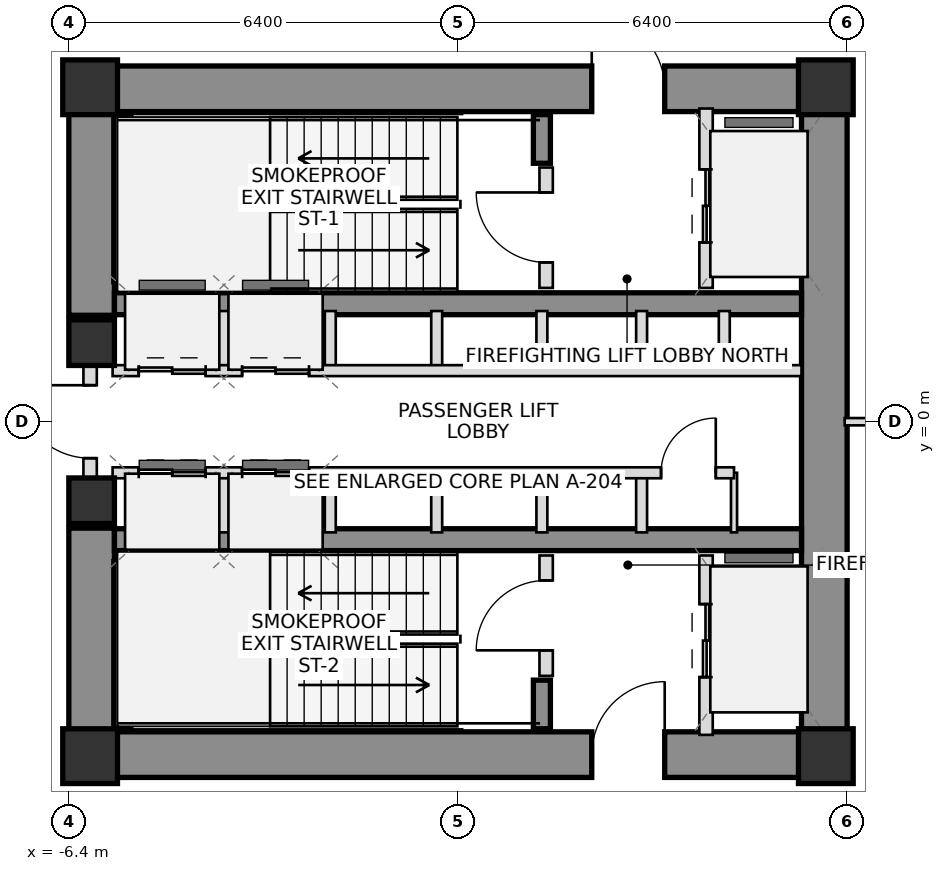
"""IFC4 building model, lengths in metres.
Left out: names, types, materials, properties, quantities, classifications, styles, units other than length and angle.
Written with IfcOpenShell. Run it as: python <this file> out.ifc"""

import sys

from ifc_helpers import new_model, si_unit, direction, frame, frame_2d, origin, origin_2d, place, context, subcontext, project, spatial, rectangle, extrude, source, transform, mapped, element, fill, save


model = new_model("IFC4")
c1 = context("Model", 3, precision=1e-05, world=origin(), true_north=direction((0.0, 1.0)))
c2 = subcontext(c1, "Body", "Model", "MODEL_VIEW")
j1 = project(units=[si_unit("LENGTHUNIT", "METRE"), si_unit("PLANEANGLEUNIT", "RADIAN")], contexts=[c1])
p1 = place(None, origin())
s1 = spatial("IfcSite", under=j1, at=p1, CompositionType="ELEMENT")
p2 = place(p1, origin())
s2 = spatial("IfcBuilding", under=s1, at=p2, CompositionType="ELEMENT")
p3 = place(p2, frame((0.0, 0.0, 20.1)))
s3 = spatial("IfcBuildingStorey", under=s2, at=p3, CompositionType="ELEMENT", Elevation=20.1)
m1 = source(origin(), c2, "Body", "SweptSolid", [
    extrude(rectangle(XDim=0.9, YDim=0.9, at=origin_2d()), origin(), (0.0, 0.0, 1.0), 3.7),
])
for number, where, z_axis, x_axis in (
    (1, (-6.05, -5.5, 0.0), (0.0, 0.0, 1.0), (1.0, 0.0, 0.0)),
    (2, (6.05, -5.5, 0.0), (0.0, 0.0, 1.0), (1.0, 0.0, 0.0)),
    (3, (6.05, 5.5, 0.0), (0.0, 0.0, 1.0), (1.0, 0.0, 0.0)),
    (4, (-6.05, 5.5, 0.0), (0.0, 0.0, 1.0), (1.0, 0.0, 0.0)),
):
    element("IfcColumn", number, at=place(p3, frame(where, z_axis=z_axis, x_axis=x_axis)), inside=s3, PredefinedType="COLUMN", context=c2, shape_type="MappedRepresentation", body=[
        mapped(m1, transform((0.0, 0.0, 0.0), scale=1.0)),
    ])
p4 = place(p3, frame((-6.4, 5.475, 0.0), z_axis=(0.0, 0.0, 1.0), x_axis=(1.0, 0.0, 0.0)))
e5 = element("IfcWall", 5, at=p4, inside=s3, PredefinedType="SHEAR", context=c2, shape_type="SweptSolid", body=[
    extrude(rectangle(XDim=12.8, YDim=0.75, at=frame_2d((6.4, 0.0))), origin(), (0.0, 0.0, 1.0), 3.7),
])
p5 = place(p4, frame((8.6, 0.0, 0.0)))
e6 = element("IfcOpeningElement", 6, at=p5, cuts=e5, PredefinedType="OPENING", context=c2, shape_type="SweptSolid", body=[
    extrude(rectangle(XDim=1.2, YDim=2.2, at=frame_2d((0.6, 1.1))), frame((0.0, 0.385, 0.0), z_axis=(0.0, -1.0, 0.0), x_axis=(1.0, 0.0, 0.0)), (0.0, 0.0, 1.0), 0.77),
])
p6 = place(p3, frame((-6.4, -5.475, 0.0), z_axis=(0.0, 0.0, 1.0), x_axis=(1.0, 0.0, 0.0)))
e7 = element("IfcWall", 7, at=p6, inside=s3, PredefinedType="SHEAR", context=c2, shape_type="SweptSolid", body=[
    extrude(rectangle(XDim=12.8, YDim=0.75, at=frame_2d((6.4, 0.0))), origin(), (0.0, 0.0, 1.0), 3.7),
])
p7 = place(p6, frame((8.6, 0.0, 0.0)))
e8 = element("IfcOpeningElement", 8, at=p7, cuts=e7, PredefinedType="OPENING", context=c2, shape_type="SweptSolid", body=[
    extrude(rectangle(XDim=1.2, YDim=2.2, at=frame_2d((0.6, 1.1))), frame((0.0, 0.385, 0.0), z_axis=(0.0, -1.0, 0.0), x_axis=(1.0, 0.0, 0.0)), (0.0, 0.0, 1.0), 0.77),
])
p8 = place(p3, frame((6.025, -5.1, 0.0), z_axis=(0.0, 0.0, 1.0), x_axis=(0.0, 1.0, 0.0)))
e9 = element("IfcWall", 9, at=p8, inside=s3, PredefinedType="SHEAR", context=c2, shape_type="SweptSolid", body=[
    extrude(rectangle(XDim=10.2, YDim=0.75, at=frame_2d((5.1, 0.0))), origin(), (0.0, 0.0, 1.0), 3.7),
])
for number, where, z_axis, x_axis in (
    (10, (-6.025, -5.1, 0.0), (0.0, 0.0, 1.0), (0.0, 1.0, 0.0)),
    (11, (-6.025, 1.75, 0.0), (0.0, 0.0, 1.0), (0.0, 1.0, 0.0)),
):
    element("IfcWall", number, at=place(p3, frame(where, z_axis=z_axis, x_axis=x_axis)), inside=s3, PredefinedType="SHEAR", context=c2, shape_type="SweptSolid", body=[
        extrude(rectangle(XDim=3.35, YDim=0.75, at=frame_2d((1.675, 0.0))), origin(), (0.0, 0.0, 1.0), 3.7),
    ])
for number, where, z_axis, x_axis in (
    (12, (-5.65, 1.94, 0.0), (0.0, 0.0, 1.0), (1.0, 0.0, 0.0)),
    (13, (-5.65, -1.94, 0.0), (0.0, 0.0, 1.0), (1.0, 0.0, 0.0)),
):
    element("IfcWall", number, at=place(p3, frame(where, z_axis=z_axis, x_axis=x_axis)), inside=s3, PredefinedType="SHEAR", context=c2, shape_type="SweptSolid", body=[
        extrude(rectangle(XDim=11.3, YDim=0.36, at=frame_2d((5.65, 0.0))), origin(), (0.0, 0.0, 1.0), 3.7),
    ])
p9 = place(p3, frame((-5.52, 2.3, 0.0), z_axis=(0.0, 0.0, 1.0), x_axis=(0.0, 1.0, 0.0)))
e14 = element("IfcWall", 14, at=p9, inside=s3, PredefinedType="SHEAR", context=c2, shape_type="SweptSolid", body=[
    extrude(rectangle(XDim=2.75, YDim=0.28, at=frame_2d((1.375, 0.0))), origin(), (0.0, 0.0, 1.0), 3.7),
])
p10 = place(p3, frame((1.38, 4.25, 0.0), z_axis=(0.0, 0.0, 1.0), x_axis=(0.0, 1.0, 0.0)))
e15 = element("IfcWall", 15, at=p10, inside=s3, PredefinedType="SHEAR", context=c2, shape_type="SweptSolid", body=[
    extrude(rectangle(XDim=0.8, YDim=0.28, at=frame_2d((0.4, 0.0))), origin(), (0.0, 0.0, 1.0), 3.7),
])
p11 = place(p3, frame((-5.52, -5.05, 0.0), z_axis=(0.0, 0.0, 1.0), x_axis=(0.0, 1.0, 0.0)))
e16 = element("IfcWall", 16, at=p11, inside=s3, PredefinedType="SHEAR", context=c2, shape_type="SweptSolid", body=[
    extrude(rectangle(XDim=2.75, YDim=0.28, at=frame_2d((1.375, 0.0))), origin(), (0.0, 0.0, 1.0), 3.7),
])
p12 = place(p3, frame((1.38, -5.05, 0.0), z_axis=(0.0, 0.0, 1.0), x_axis=(0.0, 1.0, 0.0)))
e17 = element("IfcWall", 17, at=p12, inside=s3, PredefinedType="SHEAR", context=c2, shape_type="SweptSolid", body=[
    extrude(rectangle(XDim=0.8, YDim=0.28, at=frame_2d((0.4, 0.0))), origin(), (0.0, 0.0, 1.0), 3.7),
])
m2 = source(origin(), c2, "Body", "SweptSolid", [
    extrude(rectangle(XDim=0.75, YDim=0.75, at=origin_2d()), origin(), (0.0, 0.0, 1.0), 3.7),
])
for number, where, z_axis, x_axis in (
    (18, (-6.025, -1.3, 0.0), (0.0, 0.0, 1.0), (1.0, 0.0, 0.0)),
    (19, (-6.025, 1.3, 0.0), (0.0, 0.0, 1.0), (1.0, 0.0, 0.0)),
):
    element("IfcColumn", number, at=place(p3, frame(where, z_axis=z_axis, x_axis=x_axis)), inside=s3, PredefinedType="COLUMN", context=c2, shape_type="MappedRepresentation", body=[
        mapped(m2, transform((0.0, 0.0, 0.0), scale=1.0)),
    ])
p13 = place(p3, frame((-6.05, -0.95, 0.0), z_axis=(0.0, 0.0, 1.0), x_axis=(0.0, 1.0, 0.0)))
e20 = element("IfcWall", 20, at=p13, inside=s3, PredefinedType="PLUMBINGWALL", context=c2, shape_type="SweptSolid", body=[
    extrude(rectangle(XDim=1.9, YDim=0.22, at=frame_2d((0.95, 0.0))), origin(), (0.0, 0.0, 1.0), 2.475),
])
p14 = place(p13, frame((0.35, 0.0, 0.0)))
e21 = element("IfcOpeningElement", 21, at=p14, cuts=e20, PredefinedType="OPENING", context=c2, shape_type="SweptSolid", body=[
    extrude(rectangle(XDim=1.2, YDim=2.2, at=frame_2d((0.6, 1.1))), frame((0.0, 0.12, 0.0), z_axis=(0.0, -1.0, 0.0), x_axis=(1.0, 0.0, 0.0)), (0.0, 0.0, 1.0), 0.24),
])
p15 = place(p3, frame((1.45, 2.2, 0.0), z_axis=(0.0, 0.0, 1.0), x_axis=(0.0, 1.0, 0.0)))
e22 = element("IfcWall", 22, at=p15, inside=s3, PredefinedType="PLUMBINGWALL", context=c2, shape_type="SweptSolid", body=[
    extrude(rectangle(XDim=1.98, YDim=0.22, at=frame_2d((0.99, 0.0))), origin(), (0.0, 0.0, 1.0), 3.495),
])
p16 = place(p15, frame((0.42, 0.0, 0.0)))
e23 = element("IfcOpeningElement", 23, at=p16, cuts=e22, PredefinedType="OPENING", context=c2, shape_type="SweptSolid", body=[
    extrude(rectangle(XDim=1.15, YDim=2.15, at=frame_2d((0.575, 1.075))), frame((0.0, 0.12, 0.0), z_axis=(0.0, -1.0, 0.0), x_axis=(1.0, 0.0, 0.0)), (0.0, 0.0, 1.0), 0.24),
])
p17 = place(p3, frame((4.08, 2.2, 0.0), z_axis=(0.0, 0.0, 1.0), x_axis=(0.0, 1.0, 0.0)))
e24 = element("IfcWall", 24, at=p17, inside=s3, PredefinedType="PLUMBINGWALL", context=c2, shape_type="SweptSolid", body=[
    extrude(rectangle(XDim=2.95, YDim=0.22, at=frame_2d((1.475, 0.0))), origin(), (0.0, 0.0, 1.0), 3.495),
])
p18 = place(p17, frame((0.75, 0.0, 0.0)))
e25 = element("IfcOpeningElement", 25, at=p18, cuts=e24, PredefinedType="OPENING", context=c2, shape_type="SweptSolid", body=[
    extrude(rectangle(XDim=1.2, YDim=2.25, at=frame_2d((0.6, 1.125))), frame((0.0, 0.12, 0.0), z_axis=(0.0, -1.0, 0.0), x_axis=(1.0, 0.0, 0.0)), (0.0, 0.0, 1.0), 0.24),
])
p19 = place(p3, frame((1.45, -4.18, 0.0), z_axis=(0.0, 0.0, 1.0), x_axis=(0.0, 1.0, 0.0)))
e26 = element("IfcWall", 26, at=p19, inside=s3, PredefinedType="PLUMBINGWALL", context=c2, shape_type="SweptSolid", body=[
    extrude(rectangle(XDim=1.98, YDim=0.22, at=frame_2d((0.99, 0.0))), origin(), (0.0, 0.0, 1.0), 3.495),
])
p20 = place(p19, frame((0.42, 0.0, 0.0)))
e27 = element("IfcOpeningElement", 27, at=p20, cuts=e26, PredefinedType="OPENING", context=c2, shape_type="SweptSolid", body=[
    extrude(rectangle(XDim=1.15, YDim=2.15, at=frame_2d((0.575, 1.075))), frame((0.0, 0.12, 0.0), z_axis=(0.0, -1.0, 0.0), x_axis=(1.0, 0.0, 0.0)), (0.0, 0.0, 1.0), 0.24),
])
p21 = place(p3, frame((4.08, -5.15, 0.0), z_axis=(0.0, 0.0, 1.0), x_axis=(0.0, 1.0, 0.0)))
e28 = element("IfcWall", 28, at=p21, inside=s3, PredefinedType="PLUMBINGWALL", context=c2, shape_type="SweptSolid", body=[
    extrude(rectangle(XDim=2.95, YDim=0.22, at=frame_2d((1.475, 0.0))), origin(), (0.0, 0.0, 1.0), 3.495),
])
p22 = place(p21, frame((0.95, 0.0, 0.0)))
e29 = element("IfcOpeningElement", 29, at=p22, cuts=e28, PredefinedType="OPENING", context=c2, shape_type="SweptSolid", body=[
    extrude(rectangle(XDim=1.2, YDim=2.25, at=frame_2d((0.6, 1.125))), frame((0.0, 0.12, 0.0), z_axis=(0.0, -1.0, 0.0), x_axis=(1.0, 0.0, 0.0)), (0.0, 0.0, 1.0), 0.24),
])
for number, where, z_axis, x_axis in (
    (30, (-3.85, 0.84, 0.0), (0.0, 0.0, 1.0), (0.0, 1.0, 0.0)),
    (31, (-3.85, -1.82, 0.0), (0.0, 0.0, 1.0), (0.0, 1.0, 0.0)),
    (32, (-2.1, 0.84, 0.0), (0.0, 0.0, 1.0), (0.0, 1.0, 0.0)),
    (33, (-2.1, -1.82, 0.0), (0.0, 0.0, 1.0), (0.0, 1.0, 0.0)),
    (34, (-0.35, 0.84, 0.0), (0.0, 0.0, 1.0), (0.0, 1.0, 0.0)),
    (35, (-0.35, -1.82, 0.0), (0.0, 0.0, 1.0), (0.0, 1.0, 0.0)),
    (36, (1.38, 0.84, 0.0), (0.0, 0.0, 1.0), (0.0, 1.0, 0.0)),
    (37, (1.38, -1.82, 0.0), (0.0, 0.0, 1.0), (0.0, 1.0, 0.0)),
    (38, (3.02, 0.84, 0.0), (0.0, 0.0, 1.0), (0.0, 1.0, 0.0)),
    (39, (4.38, 0.84, 0.0), (0.0, 0.0, 1.0), (0.0, 1.0, 0.0)),
    (40, (3.02, -1.82, 0.0), (0.0, 0.0, 1.0), (0.0, 1.0, 0.0)),
):
    element("IfcWall", number, at=place(p3, frame(where, z_axis=z_axis, x_axis=x_axis)), inside=s3, PredefinedType="PLUMBINGWALL", context=c2, shape_type="SweptSolid", body=[
        extrude(rectangle(XDim=0.98, YDim=0.18, at=frame_2d((0.49, 0.0))), origin(), (0.0, 0.0, 1.0), 3.495),
    ])
p23 = place(p3, frame((4.54, -1.82, 0.0), z_axis=(0.0, 0.0, 1.0), x_axis=(0.0, 1.0, 0.0)))
e41 = element("IfcWall", 41, at=p23, inside=s3, PredefinedType="PARTITIONING", context=c2, shape_type="SweptSolid", body=[
    extrude(rectangle(XDim=0.98, YDim=0.1, at=frame_2d((0.49, 0.0))), origin(), (0.0, 0.0, 1.0), 3.495),
])
p24 = place(p3, frame((-5.68, 0.84, 0.0), z_axis=(0.0, 0.0, 1.0), x_axis=(1.0, 0.0, 0.0)))
e42 = element("IfcWall", 42, at=p24, inside=s3, PredefinedType="PLUMBINGWALL", context=c2, shape_type="SweptSolid", body=[
    extrude(rectangle(XDim=11.33, YDim=0.18, at=frame_2d((5.665, 0.0))), origin(), (0.0, 0.0, 1.0), 3.495),
])
p25 = place(p24, frame((0.43, 0.0, 0.0)))
e43 = element("IfcOpeningElement", 43, at=p25, cuts=e42, PredefinedType="OPENING", context=c2, shape_type="SweptSolid", body=[
    extrude(rectangle(XDim=1.1, YDim=2.2, at=frame_2d((0.55, 1.1))), frame((0.0, 0.1, 0.0), z_axis=(0.0, -1.0, 0.0), x_axis=(1.0, 0.0, 0.0)), (0.0, 0.0, 1.0), 0.2),
])
p26 = place(p24, frame((2.13, 0.0, 0.0)))
e44 = element("IfcOpeningElement", 44, at=p26, cuts=e42, PredefinedType="OPENING", context=c2, shape_type="SweptSolid", body=[
    extrude(rectangle(XDim=1.1, YDim=2.2, at=frame_2d((0.55, 1.1))), frame((0.0, 0.1, 0.0), z_axis=(0.0, -1.0, 0.0), x_axis=(1.0, 0.0, 0.0)), (0.0, 0.0, 1.0), 0.2),
])
p27 = place(p3, frame((-5.68, -0.84, 0.0), z_axis=(0.0, 0.0, 1.0), x_axis=(1.0, 0.0, 0.0)))
e45 = element("IfcWall", 45, at=p27, inside=s3, PredefinedType="PLUMBINGWALL", context=c2, shape_type="SweptSolid", body=[
    extrude(rectangle(XDim=10.22, YDim=0.18, at=frame_2d((5.11, 0.0))), origin(), (0.0, 0.0, 1.0), 3.495),
])
p28 = place(p27, frame((0.43, 0.0, 0.0)))
e46 = element("IfcOpeningElement", 46, at=p28, cuts=e45, PredefinedType="OPENING", context=c2, shape_type="SweptSolid", body=[
    extrude(rectangle(XDim=1.1, YDim=2.2, at=frame_2d((0.55, 1.1))), frame((0.0, 0.1, 0.0), z_axis=(0.0, -1.0, 0.0), x_axis=(1.0, 0.0, 0.0)), (0.0, 0.0, 1.0), 0.2),
])
p29 = place(p27, frame((2.13, 0.0, 0.0)))
e47 = element("IfcOpeningElement", 47, at=p29, cuts=e45, PredefinedType="OPENING", context=c2, shape_type="SweptSolid", body=[
    extrude(rectangle(XDim=1.1, YDim=2.2, at=frame_2d((0.55, 1.1))), frame((0.0, 0.1, 0.0), z_axis=(0.0, -1.0, 0.0), x_axis=(1.0, 0.0, 0.0)), (0.0, 0.0, 1.0), 0.2),
])
p30 = place(p27, frame((9.02, 0.0, 0.0)))
e48 = element("IfcOpeningElement", 48, at=p30, cuts=e45, PredefinedType="OPENING", context=c2, shape_type="SweptSolid", body=[
    extrude(rectangle(XDim=0.9, YDim=2.05, at=frame_2d((0.45, 1.025))), frame((0.0, 0.1, 0.0), z_axis=(0.0, -1.0, 0.0), x_axis=(1.0, 0.0, 0.0)), (0.0, 0.0, 1.0), 0.2),
])
p31 = place(p3, frame((6.36, 0.0, 0.0), z_axis=(0.0, 0.0, 1.0), x_axis=(1.0, 0.0, 0.0)))
e49 = element("IfcWall", 49, at=p31, inside=s3, PredefinedType="PARTITIONING", context=c2, shape_type="SweptSolid", body=[
    extrude(rectangle(XDim=18.421, YDim=0.12, at=frame_2d((9.21, 0.0))), origin(), (0.0, 0.0, 1.0), 2.96),
])
p32 = place(p5, origin())
e50 = element("IfcDoor", 50, at=p32, inside=s3, OperationType="SINGLE_SWING_LEFT", PredefinedType="DOOR", context=c2, shape_type="SweptSolid", body=[
    extrude(rectangle(XDim=1.2, YDim=2.2, at=frame_2d((0.6, 1.1))), frame((0.0, 0.025, 0.0), z_axis=(0.0, -1.0, 0.0), x_axis=(1.0, 0.0, 0.0)), (0.0, 0.0, 1.0), 0.05),
])
fill(e6, e50)
p33 = place(p7, origin())
e51 = element("IfcDoor", 51, at=p33, inside=s3, OperationType="SINGLE_SWING_RIGHT", PredefinedType="DOOR", context=c2, shape_type="SweptSolid", body=[
    extrude(rectangle(XDim=1.2, YDim=2.2, at=frame_2d((0.6, 1.1))), frame((0.0, 0.025, 0.0), z_axis=(0.0, -1.0, 0.0), x_axis=(1.0, 0.0, 0.0)), (0.0, 0.0, 1.0), 0.05),
])
fill(e8, e51)
p34 = place(p14, origin())
e52 = element("IfcDoor", 52, at=p34, inside=s3, OperationType="SINGLE_SWING_RIGHT", PredefinedType="DOOR", context=c2, shape_type="SweptSolid", body=[
    extrude(rectangle(XDim=1.2, YDim=2.2, at=frame_2d((0.6, 1.1))), frame((0.0, 0.025, 0.0), z_axis=(0.0, -1.0, 0.0), x_axis=(1.0, 0.0, 0.0)), (0.0, 0.0, 1.0), 0.05),
])
fill(e21, e52)
p35 = place(p16, origin())
e53 = element("IfcDoor", 53, at=p35, inside=s3, OperationType="SINGLE_SWING_RIGHT", PredefinedType="DOOR", context=c2, shape_type="SweptSolid", body=[
    extrude(rectangle(XDim=1.15, YDim=2.15, at=frame_2d((0.575, 1.075))), frame((0.0, 0.025, 0.0), z_axis=(0.0, -1.0, 0.0), x_axis=(1.0, 0.0, 0.0)), (0.0, 0.0, 1.0), 0.05),
])
fill(e23, e53)
p36 = place(p18, origin())
e54 = element("IfcDoor", 54, at=p36, inside=s3, OperationType="DOUBLE_DOOR_SLIDING", PredefinedType="DOOR", context=c2, shape_type="SweptSolid", body=[
    extrude(rectangle(XDim=1.2, YDim=2.25, at=frame_2d((0.6, 1.125))), frame((0.0, 0.025, 0.0), z_axis=(0.0, -1.0, 0.0), x_axis=(1.0, 0.0, 0.0)), (0.0, 0.0, 1.0), 0.05),
])
fill(e25, e54)
p37 = place(p20, origin())
e55 = element("IfcDoor", 55, at=p37, inside=s3, OperationType="SINGLE_SWING_LEFT", PredefinedType="DOOR", context=c2, shape_type="SweptSolid", body=[
    extrude(rectangle(XDim=1.15, YDim=2.15, at=frame_2d((0.575, 1.075))), frame((0.0, 0.025, 0.0), z_axis=(0.0, -1.0, 0.0), x_axis=(1.0, 0.0, 0.0)), (0.0, 0.0, 1.0), 0.05),
])
fill(e27, e55)
p38 = place(p22, origin())
e56 = element("IfcDoor", 56, at=p38, inside=s3, OperationType="DOUBLE_DOOR_SLIDING", PredefinedType="DOOR", context=c2, shape_type="SweptSolid", body=[
    extrude(rectangle(XDim=1.2, YDim=2.25, at=frame_2d((0.6, 1.125))), frame((0.0, 0.025, 0.0), z_axis=(0.0, -1.0, 0.0), x_axis=(1.0, 0.0, 0.0)), (0.0, 0.0, 1.0), 0.05),
])
fill(e29, e56)
p39 = place(p25, origin())
e57 = element("IfcDoor", 57, at=p39, inside=s3, OperationType="DOUBLE_DOOR_SLIDING", PredefinedType="DOOR", context=c2, shape_type="SweptSolid", body=[
    extrude(rectangle(XDim=1.1, YDim=2.2, at=frame_2d((0.55, 1.1))), frame((0.0, 0.025, 0.0), z_axis=(0.0, -1.0, 0.0), x_axis=(1.0, 0.0, 0.0)), (0.0, 0.0, 1.0), 0.05),
])
fill(e43, e57)
p40 = place(p26, origin())
e58 = element("IfcDoor", 58, at=p40, inside=s3, OperationType="DOUBLE_DOOR_SLIDING", PredefinedType="DOOR", context=c2, shape_type="SweptSolid", body=[
    extrude(rectangle(XDim=1.1, YDim=2.2, at=frame_2d((0.55, 1.1))), frame((0.0, 0.025, 0.0), z_axis=(0.0, -1.0, 0.0), x_axis=(1.0, 0.0, 0.0)), (0.0, 0.0, 1.0), 0.05),
])
fill(e44, e58)
p41 = place(p28, origin())
e59 = element("IfcDoor", 59, at=p41, inside=s3, OperationType="DOUBLE_DOOR_SLIDING", PredefinedType="DOOR", context=c2, shape_type="SweptSolid", body=[
    extrude(rectangle(XDim=1.1, YDim=2.2, at=frame_2d((0.55, 1.1))), frame((0.0, 0.025, 0.0), z_axis=(0.0, -1.0, 0.0), x_axis=(1.0, 0.0, 0.0)), (0.0, 0.0, 1.0), 0.05),
])
fill(e46, e59)
p42 = place(p29, origin())
e60 = element("IfcDoor", 60, at=p42, inside=s3, OperationType="DOUBLE_DOOR_SLIDING", PredefinedType="DOOR", context=c2, shape_type="SweptSolid", body=[
    extrude(rectangle(XDim=1.1, YDim=2.2, at=frame_2d((0.55, 1.1))), frame((0.0, 0.025, 0.0), z_axis=(0.0, -1.0, 0.0), x_axis=(1.0, 0.0, 0.0)), (0.0, 0.0, 1.0), 0.05),
])
fill(e47, e60)
p43 = place(p30, origin())
e61 = element("IfcDoor", 61, at=p43, inside=s3, OperationType="SINGLE_SWING_RIGHT", PredefinedType="DOOR", context=c2, shape_type="SweptSolid", body=[
    extrude(rectangle(XDim=0.9, YDim=2.05, at=frame_2d((0.45, 1.025))), frame((0.0, 0.025, 0.0), z_axis=(0.0, -1.0, 0.0), x_axis=(1.0, 0.0, 0.0)), (0.0, 0.0, 1.0), 0.05),
])
fill(e48, e61)
save(model, sys.argv[1])
